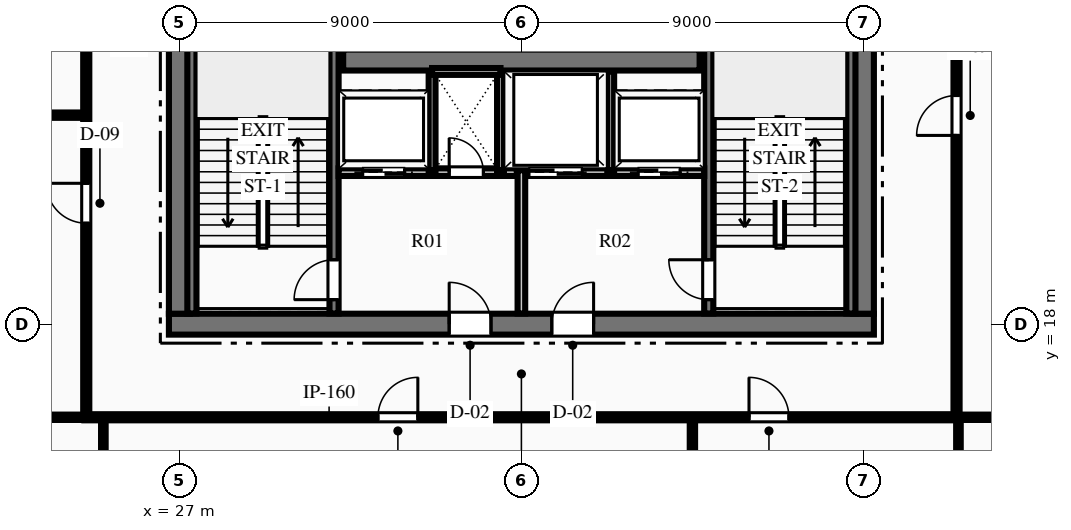
"""IFC4 building model, lengths in metres.
Left out: names, types, materials, properties, quantities, classifications, styles, units other than length and angle.
Written with IfcOpenShell. Run it as: python <this file> out.ifc"""

import sys

from ifc_helpers import new_model, si_unit, direction, frame, frame_2d, origin, place, context, subcontext, project, spatial, rectangle, extrude, element, fill, save


model = new_model("IFC4")
c1 = context("Model", 3, precision=1e-05, world=origin(), true_north=direction((0.0, 1.0)))
c2 = subcontext(c1, "Body", "Model", "MODEL_VIEW")
j1 = project(units=[si_unit("LENGTHUNIT", "METRE"), si_unit("PLANEANGLEUNIT", "RADIAN")], contexts=[c1])
p1 = place(None, origin())
s1 = spatial("IfcSite", under=j1, at=p1, CompositionType="ELEMENT")
p2 = place(p1, origin())
s2 = spatial("IfcBuilding", under=s1, at=p2, CompositionType="ELEMENT")
p3 = place(p2, frame((0.0, 0.0, 131.7)))
s3 = spatial("IfcBuildingStorey", under=s2, at=p3, CompositionType="ELEMENT", Elevation=131.7)
p4 = place(p3, frame((26.725, 18.0, 0.0), z_axis=(0.0, 0.0, 1.0), x_axis=(1.0, 0.0, 0.0)))
e1 = element("IfcWall", 1, at=p4, inside=s3, PredefinedType="SHEAR", context=c2, shape_type="SweptSolid", body=[
    extrude(rectangle(XDim=18.55, YDim=0.55, at=frame_2d((9.275, 0.0))), origin(), (0.0, 0.0, 1.0), 4.5),
])
p5 = place(p4, frame((7.375, 0.0, 0.0)))
e2 = element("IfcOpeningElement", 2, at=p5, cuts=e1, PredefinedType="OPENING", context=c2, shape_type="SweptSolid", body=[
    extrude(rectangle(XDim=1.1, YDim=2.15, at=frame_2d((0.55, 1.075))), frame((0.0, 0.285, 0.0), z_axis=(0.0, -1.0, 0.0), x_axis=(1.0, 0.0, 0.0)), (0.0, 0.0, 1.0), 0.57),
])
p6 = place(p4, frame((10.075, 0.0, 0.0)))
e3 = element("IfcOpeningElement", 3, at=p6, cuts=e1, PredefinedType="OPENING", context=c2, shape_type="SweptSolid", body=[
    extrude(rectangle(XDim=1.1, YDim=2.15, at=frame_2d((0.55, 1.075))), frame((0.0, 0.285, 0.0), z_axis=(0.0, -1.0, 0.0), x_axis=(1.0, 0.0, 0.0)), (0.0, 0.0, 1.0), 0.57),
])
p7 = place(p3, frame((27.0, 18.275, 0.0), z_axis=(0.0, 0.0, 1.0), x_axis=(0.0, 1.0, 0.0)))
e4 = element("IfcWall", 4, at=p7, inside=s3, PredefinedType="SHEAR", context=c2, shape_type="SweptSolid", body=[
    extrude(rectangle(XDim=15.45, YDim=0.55, at=frame_2d((7.725, 0.0))), origin(), (0.0, 0.0, 1.0), 4.5),
])
p8 = place(p7, frame((9.965, 0.0, 0.0)))
e5 = element("IfcOpeningElement", 5, at=p8, cuts=e4, PredefinedType="OPENING", context=c2, shape_type="SweptSolid", body=[
    extrude(rectangle(XDim=1.4, YDim=2.2, at=frame_2d((0.7, 1.1))), frame((0.0, 0.285, 0.0), z_axis=(0.0, -1.0, 0.0), x_axis=(1.0, 0.0, 0.0)), (0.0, 0.0, 1.0), 0.57),
])
p9 = place(p3, frame((45.0, 18.275, 0.0), z_axis=(0.0, 0.0, 1.0), x_axis=(0.0, 1.0, 0.0)))
e6 = element("IfcWall", 6, at=p9, inside=s3, PredefinedType="SHEAR", context=c2, shape_type="SweptSolid", body=[
    extrude(rectangle(XDim=15.45, YDim=0.55, at=frame_2d((7.725, 0.0))), origin(), (0.0, 0.0, 1.0), 4.5),
])
p10 = place(p9, frame((9.965, 0.0, 0.0)))
e7 = element("IfcOpeningElement", 7, at=p10, cuts=e6, PredefinedType="OPENING", context=c2, shape_type="SweptSolid", body=[
    extrude(rectangle(XDim=1.4, YDim=2.2, at=frame_2d((0.7, 1.1))), frame((0.0, 0.285, 0.0), z_axis=(0.0, -1.0, 0.0), x_axis=(1.0, 0.0, 0.0)), (0.0, 0.0, 1.0), 0.57),
])
p11 = place(p3, frame((31.31, 24.95, 0.0), z_axis=(0.0, 0.0, 1.0), x_axis=(1.0, 0.0, 0.0)))
e8 = element("IfcWall", 8, at=p11, inside=s3, PredefinedType="SHEAR", context=c2, shape_type="SweptSolid", body=[
    extrude(rectangle(XDim=9.38, YDim=0.55, at=frame_2d((4.69, 0.0))), origin(), (0.0, 0.0, 1.0), 4.5),
])
p12 = place(p3, frame((31.07, 18.28, 0.0), z_axis=(0.0, 0.0, 1.0), x_axis=(0.0, 1.0, 0.0)))
e9 = element("IfcWall", 9, at=p12, inside=s3, PredefinedType="SHEAR", context=c2, shape_type="SweptSolid", body=[
    extrude(rectangle(XDim=8.26, YDim=0.24, at=frame_2d((4.13, 0.0))), origin(), (0.0, 0.0, 1.0), 4.5),
])
p13 = place(p12, frame((0.365, 0.0, 0.0)))
e10 = element("IfcOpeningElement", 10, at=p13, cuts=e9, PredefinedType="OPENING", context=c2, shape_type="SweptSolid", body=[
    extrude(rectangle(XDim=1.05, YDim=2.15, at=frame_2d((0.525, 1.075))), frame((0.0, 0.13, 0.0), z_axis=(0.0, -1.0, 0.0), x_axis=(1.0, 0.0, 0.0)), (0.0, 0.0, 1.0), 0.26),
])
p14 = place(p3, frame((27.33, 18.28, 0.0), z_axis=(0.0, 0.0, 1.0), x_axis=(0.0, 1.0, 0.0)))
e11 = element("IfcWall", 11, at=p14, inside=s3, PredefinedType="SHEAR", context=c2, shape_type="SweptSolid", body=[
    extrude(rectangle(XDim=8.26, YDim=0.24, at=frame_2d((4.13, 0.0))), origin(), (0.0, 0.0, 1.0), 4.5),
])
p15 = place(p3, frame((40.93, 18.28, 0.0), z_axis=(0.0, 0.0, 1.0), x_axis=(0.0, 1.0, 0.0)))
e12 = element("IfcWall", 12, at=p15, inside=s3, PredefinedType="SHEAR", context=c2, shape_type="SweptSolid", body=[
    extrude(rectangle(XDim=8.26, YDim=0.24, at=frame_2d((4.13, 0.0))), origin(), (0.0, 0.0, 1.0), 4.5),
])
p16 = place(p15, frame((0.365, 0.0, 0.0)))
e13 = element("IfcOpeningElement", 13, at=p16, cuts=e12, PredefinedType="OPENING", context=c2, shape_type="SweptSolid", body=[
    extrude(rectangle(XDim=1.05, YDim=2.15, at=frame_2d((0.525, 1.075))), frame((0.0, 0.13, 0.0), z_axis=(0.0, -1.0, 0.0), x_axis=(1.0, 0.0, 0.0)), (0.0, 0.0, 1.0), 0.26),
])
p17 = place(p3, frame((44.67, 18.28, 0.0), z_axis=(0.0, 0.0, 1.0), x_axis=(0.0, 1.0, 0.0)))
e14 = element("IfcWall", 14, at=p17, inside=s3, PredefinedType="SHEAR", context=c2, shape_type="SweptSolid", body=[
    extrude(rectangle(XDim=8.26, YDim=0.24, at=frame_2d((4.13, 0.0))), origin(), (0.0, 0.0, 1.0), 4.5),
])
p18 = place(p3, frame((36.0, 18.28, 0.0), z_axis=(0.0, 0.0, 1.0), x_axis=(0.0, 1.0, 0.0)))
e15 = element("IfcWall", 15, at=p18, inside=s3, PredefinedType="PARTITIONING", context=c2, shape_type="SweptSolid", body=[
    extrude(rectangle(XDim=3.77, YDim=0.2, at=frame_2d((1.885, 0.0))), origin(), (0.0, 0.0, 1.0), 4.1),
])
p19 = place(p3, frame((31.19, 22.0, 0.0), z_axis=(0.0, 0.0, 1.0), x_axis=(1.0, 0.0, 0.0)))
e16 = element("IfcWall", 16, at=p19, inside=s3, PredefinedType="PARTITIONING", context=c2, shape_type="SweptSolid", body=[
    extrude(rectangle(XDim=4.69, YDim=0.2, at=frame_2d((2.345, 0.0))), origin(), (0.0, 0.0, 1.0), 4.1),
])
p20 = place(p19, frame((2.91, 0.0, 0.0)))
e17 = element("IfcOpeningElement", 17, at=p20, cuts=e16, PredefinedType="OPENING", context=c2, shape_type="SweptSolid", body=[
    extrude(rectangle(XDim=0.9, YDim=2.15, at=frame_2d((0.45, 1.075))), frame((0.0, 0.11, 0.0), z_axis=(0.0, -1.0, 0.0), x_axis=(1.0, 0.0, 0.0)), (0.0, 0.0, 1.0), 0.22),
])
p21 = place(p19, frame((0.635, 0.0, 0.0)))
e18 = element("IfcOpeningElement", 18, at=p21, cuts=e16, PredefinedType="OPENING", context=c2, shape_type="SweptSolid", body=[
    extrude(rectangle(XDim=1.1, YDim=2.15, at=frame_2d((0.55, 1.075))), frame((0.0, 0.11, 0.0), z_axis=(0.0, -1.0, 0.0), x_axis=(1.0, 0.0, 0.0)), (0.0, 0.0, 1.0), 0.22),
])
p22 = place(p3, frame((36.12, 22.0, 0.0), z_axis=(0.0, 0.0, 1.0), x_axis=(1.0, 0.0, 0.0)))
e19 = element("IfcWall", 19, at=p22, inside=s3, PredefinedType="PARTITIONING", context=c2, shape_type="SweptSolid", body=[
    extrude(rectangle(XDim=4.69, YDim=0.2, at=frame_2d((2.345, 0.0))), origin(), (0.0, 0.0, 1.0), 4.1),
])
p23 = place(p22, frame((2.955, 0.0, 0.0)))
e20 = element("IfcOpeningElement", 20, at=p23, cuts=e19, PredefinedType="OPENING", context=c2, shape_type="SweptSolid", body=[
    extrude(rectangle(XDim=1.1, YDim=2.15, at=frame_2d((0.55, 1.075))), frame((0.0, 0.11, 0.0), z_axis=(0.0, -1.0, 0.0), x_axis=(1.0, 0.0, 0.0)), (0.0, 0.0, 1.0), 0.22),
])
p24 = place(p22, frame((0.08, 0.0, 0.0)))
e21 = element("IfcOpeningElement", 21, at=p24, cuts=e19, PredefinedType="OPENING", context=c2, shape_type="SweptSolid", body=[
    extrude(rectangle(XDim=1.4, YDim=2.2, at=frame_2d((0.7, 1.1))), frame((0.0, 0.11, 0.0), z_axis=(0.0, -1.0, 0.0), x_axis=(1.0, 0.0, 0.0)), (0.0, 0.0, 1.0), 0.22),
])
for number, where, z_axis, x_axis in (
    (22, (33.65, 22.05, 0.0), (0.0, 0.0, 1.0), (0.0, 1.0, 0.0)),
    (23, (35.45, 22.05, 0.0), (0.0, 0.0, 1.0), (0.0, 1.0, 0.0)),
):
    element("IfcWall", number, at=place(p3, frame(where, z_axis=z_axis, x_axis=x_axis)), inside=s3, PredefinedType="PARTITIONING", context=c2, shape_type="SweptSolid", body=[
        extrude(rectangle(XDim=2.6, YDim=0.18, at=frame_2d((1.3, 0.0))), origin(), (0.0, 0.0, 1.0), 4.1),
    ])
p25 = place(p3, frame((33.65, 24.65, 0.0), z_axis=(0.0, 0.0, 1.0), x_axis=(1.0, 0.0, 0.0)))
e24 = element("IfcWall", 24, at=p25, inside=s3, PredefinedType="PARTITIONING", context=c2, shape_type="SweptSolid", body=[
    extrude(rectangle(XDim=1.8, YDim=0.18, at=frame_2d((0.9, 0.0))), origin(), (0.0, 0.0, 1.0), 4.1),
])
p26 = place(p3, frame((38.35, 22.05, 0.0), z_axis=(0.0, 0.0, 1.0), x_axis=(0.0, 1.0, 0.0)))
e25 = element("IfcWall", 25, at=p26, inside=s3, PredefinedType="PARTITIONING", context=c2, shape_type="SweptSolid", body=[
    extrude(rectangle(XDim=2.6, YDim=0.18, at=frame_2d((1.3, 0.0))), origin(), (0.0, 0.0, 1.0), 4.1),
])
p27 = place(p3, frame((24.5, 15.55, 0.0), z_axis=(0.0, 0.0, 1.0), x_axis=(1.0, 0.0, 0.0)))
e26 = element("IfcWall", 26, at=p27, inside=s3, PredefinedType="PARTITIONING", context=c2, shape_type="SweptSolid", body=[
    extrude(rectangle(XDim=23.0, YDim=0.16, at=frame_2d((11.5, 0.0))), origin(), (0.0, 0.0, 1.0), 4.1),
])
p28 = place(p27, frame((7.725, 0.0, 0.0)))
e27 = element("IfcOpeningElement", 27, at=p28, cuts=e26, PredefinedType="OPENING", context=c2, shape_type="SweptSolid", body=[
    extrude(rectangle(XDim=1.05, YDim=2.15, at=frame_2d((0.525, 1.075))), frame((0.0, 0.09, 0.0), z_axis=(0.0, -1.0, 0.0), x_axis=(1.0, 0.0, 0.0)), (0.0, 0.0, 1.0), 0.18),
])
p29 = place(p27, frame((17.489, 0.0, 0.0)))
e28 = element("IfcOpeningElement", 28, at=p29, cuts=e26, PredefinedType="OPENING", context=c2, shape_type="SweptSolid", body=[
    extrude(rectangle(XDim=1.05, YDim=2.15, at=frame_2d((0.525, 1.075))), frame((0.0, 0.09, 0.0), z_axis=(0.0, -1.0, 0.0), x_axis=(1.0, 0.0, 0.0)), (0.0, 0.0, 1.0), 0.18),
])
p30 = place(p3, frame((24.55, 15.55, 0.0), z_axis=(0.0, 0.0, 1.0), x_axis=(0.0, 1.0, 0.0)))
e29 = element("IfcWall", 29, at=p30, inside=s3, PredefinedType="PARTITIONING", context=c2, shape_type="SweptSolid", body=[
    extrude(rectangle(XDim=20.9, YDim=0.16, at=frame_2d((10.45, 0.0))), origin(), (0.0, 0.0, 1.0), 4.1),
])
p31 = place(p30, frame((5.107, 0.0, 0.0)))
e30 = element("IfcOpeningElement", 30, at=p31, cuts=e29, PredefinedType="OPENING", context=c2, shape_type="SweptSolid", body=[
    extrude(rectangle(XDim=1.05, YDim=2.15, at=frame_2d((0.525, 1.075))), frame((0.0, 0.09, 0.0), z_axis=(0.0, -1.0, 0.0), x_axis=(1.0, 0.0, 0.0)), (0.0, 0.0, 1.0), 0.18),
])
p32 = place(p30, frame((12.155, 0.0, 0.0)))
e31 = element("IfcOpeningElement", 31, at=p32, cuts=e29, PredefinedType="OPENING", context=c2, shape_type="SweptSolid", body=[
    extrude(rectangle(XDim=1.05, YDim=2.15, at=frame_2d((0.525, 1.075))), frame((0.0, 0.09, 0.0), z_axis=(0.0, -1.0, 0.0), x_axis=(1.0, 0.0, 0.0)), (0.0, 0.0, 1.0), 0.18),
])
p33 = place(p30, frame((16.443, 0.0, 0.0)))
e32 = element("IfcOpeningElement", 32, at=p33, cuts=e29, PredefinedType="OPENING", context=c2, shape_type="SweptSolid", body=[
    extrude(rectangle(XDim=1.05, YDim=2.15, at=frame_2d((0.525, 1.075))), frame((0.0, 0.09, 0.0), z_axis=(0.0, -1.0, 0.0), x_axis=(1.0, 0.0, 0.0)), (0.0, 0.0, 1.0), 0.18),
])
p34 = place(p3, frame((47.45, 15.55, 0.0), z_axis=(0.0, 0.0, 1.0), x_axis=(0.0, 1.0, 0.0)))
e33 = element("IfcWall", 33, at=p34, inside=s3, PredefinedType="PARTITIONING", context=c2, shape_type="SweptSolid", body=[
    extrude(rectangle(XDim=20.9, YDim=0.16, at=frame_2d((10.45, 0.0))), origin(), (0.0, 0.0, 1.0), 4.1),
])
p35 = place(p34, frame((7.417, 0.0, 0.0)))
e34 = element("IfcOpeningElement", 34, at=p35, cuts=e33, PredefinedType="OPENING", context=c2, shape_type="SweptSolid", body=[
    extrude(rectangle(XDim=1.05, YDim=2.15, at=frame_2d((0.525, 1.075))), frame((0.0, 0.09, 0.0), z_axis=(0.0, -1.0, 0.0), x_axis=(1.0, 0.0, 0.0)), (0.0, 0.0, 1.0), 0.18),
])
p36 = place(p3, frame((12.281, 15.55, 0.0), z_axis=(0.0, 0.0, 1.0), x_axis=(1.0, 0.0, 0.0)))
e35 = element("IfcWall", 35, at=p36, inside=s3, PredefinedType="PARTITIONING", context=c2, shape_type="SweptSolid", body=[
    extrude(rectangle(XDim=12.269, YDim=0.14, at=frame_2d((6.134, 0.0))), origin(), (0.0, 0.0, 1.0), 4.1),
])
p37 = place(p36, frame((8.413, 0.0, 0.0)))
e36 = element("IfcOpeningElement", 36, at=p37, cuts=e35, PredefinedType="OPENING", context=c2, shape_type="SweptSolid", body=[
    extrude(rectangle(XDim=0.95, YDim=2.15, at=frame_2d((0.475, 1.075))), frame((0.0, 0.08, 0.0), z_axis=(0.0, -1.0, 0.0), x_axis=(1.0, 0.0, 0.0)), (0.0, 0.0, 1.0), 0.16),
])
p38 = place(p3, frame((47.45, 15.55, 0.0), z_axis=(0.0, 0.0, 1.0), x_axis=(1.0, 0.0, 0.0)))
e37 = element("IfcWall", 37, at=p38, inside=s3, PredefinedType="PARTITIONING", context=c2, shape_type="SweptSolid", body=[
    extrude(rectangle(XDim=18.276, YDim=0.14, at=frame_2d((9.138, 0.0))), origin(), (0.0, 0.0, 1.0), 4.1),
])
p39 = place(p38, frame((1.544, 0.0, 0.0)))
e38 = element("IfcOpeningElement", 38, at=p39, cuts=e37, PredefinedType="OPENING", context=c2, shape_type="SweptSolid", body=[
    extrude(rectangle(XDim=0.95, YDim=2.15, at=frame_2d((0.475, 1.075))), frame((0.0, 0.08, 0.0), z_axis=(0.0, -1.0, 0.0), x_axis=(1.0, 0.0, 0.0)), (0.0, 0.0, 1.0), 0.16),
])
p40 = place(p38, frame((8.316, 0.0, 0.0)))
e39 = element("IfcOpeningElement", 39, at=p40, cuts=e37, PredefinedType="OPENING", context=c2, shape_type="SweptSolid", body=[
    extrude(rectangle(XDim=0.95, YDim=2.15, at=frame_2d((0.475, 1.075))), frame((0.0, 0.08, 0.0), z_axis=(0.0, -1.0, 0.0), x_axis=(1.0, 0.0, 0.0)), (0.0, 0.0, 1.0), 0.16),
])
p41 = place(p3, frame((25.0, -4.183, 0.0), z_axis=(0.0, 0.0, 1.0), x_axis=(0.0, 1.0, 0.0)))
e40 = element("IfcWall", 40, at=p41, inside=s3, PredefinedType="PARTITIONING", context=c2, shape_type="SweptSolid", body=[
    extrude(rectangle(XDim=19.733, YDim=0.12, at=frame_2d((9.867, 0.0))), origin(), (0.0, 0.0, 1.0), 4.1),
])
p42 = place(p3, frame((40.5, 0.363, 0.0), z_axis=(0.0, 0.0, 1.0), x_axis=(0.0, 1.0, 0.0)))
e41 = element("IfcWall", 41, at=p42, inside=s3, PredefinedType="PARTITIONING", context=c2, shape_type="SweptSolid", body=[
    extrude(rectangle(XDim=15.187, YDim=0.14, at=frame_2d((7.594, 0.0))), origin(), (0.0, 0.0, 1.0), 4.1),
])
p43 = place(p3, frame((47.5, 4.577, 0.0), z_axis=(0.0, 0.0, 1.0), x_axis=(0.0, 1.0, 0.0)))
e42 = element("IfcWall", 42, at=p43, inside=s3, PredefinedType="PARTITIONING", context=c2, shape_type="SweptSolid", body=[
    extrude(rectangle(XDim=10.973, YDim=0.12, at=frame_2d((5.487, 0.0))), origin(), (0.0, 0.0, 1.0), 4.1),
])
p44 = place(p3, frame((7.495, 23.5, 0.0), z_axis=(0.0, 0.0, 1.0), x_axis=(1.0, 0.0, 0.0)))
e43 = element("IfcWall", 43, at=p44, inside=s3, PredefinedType="PARTITIONING", context=c2, shape_type="SweptSolid", body=[
    extrude(rectangle(XDim=17.055, YDim=0.14, at=frame_2d((8.527, 0.0))), origin(), (0.0, 0.0, 1.0), 4.1),
])
p45 = place(p13, origin())
e44 = element("IfcDoor", 44, at=p45, inside=s3, OperationType="SINGLE_SWING_LEFT", PredefinedType="DOOR", context=c2, shape_type="SweptSolid", body=[
    extrude(rectangle(XDim=1.05, YDim=2.15, at=frame_2d((0.525, 1.075))), frame((0.0, 0.025, 0.0), z_axis=(0.0, -1.0, 0.0), x_axis=(1.0, 0.0, 0.0)), (0.0, 0.0, 1.0), 0.05),
])
fill(e10, e44)
p46 = place(p16, origin())
e45 = element("IfcDoor", 45, at=p46, inside=s3, OperationType="SINGLE_SWING_RIGHT", PredefinedType="DOOR", context=c2, shape_type="SweptSolid", body=[
    extrude(rectangle(XDim=1.05, YDim=2.15, at=frame_2d((0.525, 1.075))), frame((0.0, 0.025, 0.0), z_axis=(0.0, -1.0, 0.0), x_axis=(1.0, 0.0, 0.0)), (0.0, 0.0, 1.0), 0.05),
])
fill(e13, e45)
p47 = place(p5, origin())
e46 = element("IfcDoor", 46, at=p47, inside=s3, OperationType="SINGLE_SWING_LEFT", PredefinedType="DOOR", context=c2, shape_type="SweptSolid", body=[
    extrude(rectangle(XDim=1.1, YDim=2.15, at=frame_2d((0.55, 1.075))), frame((0.0, 0.025, 0.0), z_axis=(0.0, -1.0, 0.0), x_axis=(1.0, 0.0, 0.0)), (0.0, 0.0, 1.0), 0.05),
])
fill(e2, e46)
p48 = place(p6, origin())
e47 = element("IfcDoor", 47, at=p48, inside=s3, OperationType="SINGLE_SWING_RIGHT", PredefinedType="DOOR", context=c2, shape_type="SweptSolid", body=[
    extrude(rectangle(XDim=1.1, YDim=2.15, at=frame_2d((0.55, 1.075))), frame((0.0, 0.025, 0.0), z_axis=(0.0, -1.0, 0.0), x_axis=(1.0, 0.0, 0.0)), (0.0, 0.0, 1.0), 0.05),
])
fill(e3, e47)
p49 = place(p20, origin())
e48 = element("IfcDoor", 48, at=p49, inside=s3, OperationType="SINGLE_SWING_LEFT", PredefinedType="DOOR", context=c2, shape_type="SweptSolid", body=[
    extrude(rectangle(XDim=0.9, YDim=2.15, at=frame_2d((0.45, 1.075))), frame((0.0, 0.025, 0.0), z_axis=(0.0, -1.0, 0.0), x_axis=(1.0, 0.0, 0.0)), (0.0, 0.0, 1.0), 0.05),
])
fill(e17, e48)
p50 = place(p28, origin())
e49 = element("IfcDoor", 49, at=p50, inside=s3, OperationType="SINGLE_SWING_RIGHT", PredefinedType="DOOR", context=c2, shape_type="SweptSolid", body=[
    extrude(rectangle(XDim=1.05, YDim=2.15, at=frame_2d((0.525, 1.075))), frame((0.0, 0.025, 0.0), z_axis=(0.0, -1.0, 0.0), x_axis=(1.0, 0.0, 0.0)), (0.0, 0.0, 1.0), 0.05),
])
fill(e27, e49)
p51 = place(p29, origin())
e50 = element("IfcDoor", 50, at=p51, inside=s3, OperationType="SINGLE_SWING_LEFT", PredefinedType="DOOR", context=c2, shape_type="SweptSolid", body=[
    extrude(rectangle(XDim=1.05, YDim=2.15, at=frame_2d((0.525, 1.075))), frame((0.0, 0.025, 0.0), z_axis=(0.0, -1.0, 0.0), x_axis=(1.0, 0.0, 0.0)), (0.0, 0.0, 1.0), 0.05),
])
fill(e28, e50)
p52 = place(p31, origin())
e51 = element("IfcDoor", 51, at=p52, inside=s3, OperationType="SINGLE_SWING_RIGHT", PredefinedType="DOOR", context=c2, shape_type="SweptSolid", body=[
    extrude(rectangle(XDim=1.05, YDim=2.15, at=frame_2d((0.525, 1.075))), frame((0.0, 0.025, 0.0), z_axis=(0.0, -1.0, 0.0), x_axis=(1.0, 0.0, 0.0)), (0.0, 0.0, 1.0), 0.05),
])
fill(e30, e51)
p53 = place(p35, origin())
e52 = element("IfcDoor", 52, at=p53, inside=s3, OperationType="SINGLE_SWING_LEFT", PredefinedType="DOOR", context=c2, shape_type="SweptSolid", body=[
    extrude(rectangle(XDim=1.05, YDim=2.15, at=frame_2d((0.525, 1.075))), frame((0.0, 0.025, 0.0), z_axis=(0.0, -1.0, 0.0), x_axis=(1.0, 0.0, 0.0)), (0.0, 0.0, 1.0), 0.05),
])
fill(e34, e52)
p54 = place(p21, origin())
e53 = element("IfcDoor", 53, at=p54, inside=s3, OperationType="SLIDING_TO_LEFT", PredefinedType="DOOR", context=c2, shape_type="SweptSolid", body=[
    extrude(rectangle(XDim=1.1, YDim=2.15, at=frame_2d((0.55, 1.075))), frame((0.0, 0.025, 0.0), z_axis=(0.0, -1.0, 0.0), x_axis=(1.0, 0.0, 0.0)), (0.0, 0.0, 1.0), 0.05),
])
fill(e18, e53)
p55 = place(p23, origin())
e54 = element("IfcDoor", 54, at=p55, inside=s3, OperationType="SLIDING_TO_LEFT", PredefinedType="DOOR", context=c2, shape_type="SweptSolid", body=[
    extrude(rectangle(XDim=1.1, YDim=2.15, at=frame_2d((0.55, 1.075))), frame((0.0, 0.025, 0.0), z_axis=(0.0, -1.0, 0.0), x_axis=(1.0, 0.0, 0.0)), (0.0, 0.0, 1.0), 0.05),
])
fill(e20, e54)
p56 = place(p24, origin())
e55 = element("IfcDoor", 55, at=p56, inside=s3, OperationType="SLIDING_TO_LEFT", PredefinedType="DOOR", context=c2, shape_type="SweptSolid", body=[
    extrude(rectangle(XDim=1.4, YDim=2.2, at=frame_2d((0.7, 1.1))), frame((0.0, 0.025, 0.0), z_axis=(0.0, -1.0, 0.0), x_axis=(1.0, 0.0, 0.0)), (0.0, 0.0, 1.0), 0.05),
])
fill(e21, e55)
save(model, sys.argv[1])
